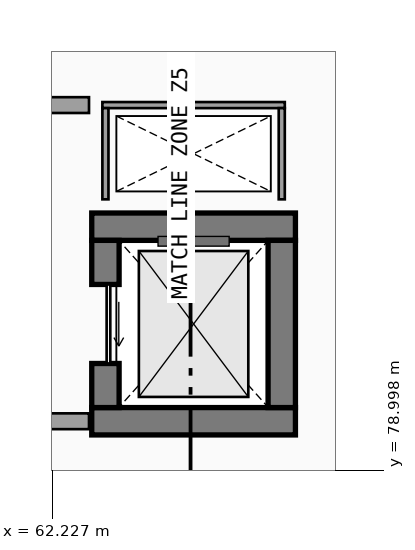
"""IFC4 building model, lengths in metres.
Left out: names, types, materials, properties, quantities, classifications, styles, units other than length and angle.
Written with IfcOpenShell. Run it as: python <this file> out.ifc"""

import sys

from ifc_helpers import new_model, si_unit, direction, frame, frame_2d, origin, place, context, subcontext, project, spatial, rectangle, extrude, element, fill, save


model = new_model("IFC4")
c1 = context("Model", 3, precision=1e-05, world=origin(), true_north=direction((0.0, 1.0)))
c2 = subcontext(c1, "Body", "Model", "MODEL_VIEW")
j1 = project(units=[si_unit("LENGTHUNIT", "METRE"), si_unit("PLANEANGLEUNIT", "RADIAN")], contexts=[c1])
p1 = place(None, origin())
s1 = spatial("IfcSite", under=j1, at=p1, CompositionType="ELEMENT")
p2 = place(p1, origin())
s2 = spatial("IfcBuilding", under=s1, at=p2, CompositionType="ELEMENT")
p3 = place(p2, frame((0.0, 0.0, 9.6)))
s3 = spatial("IfcBuildingStorey", under=s2, at=p3, CompositionType="ELEMENT", Elevation=9.6)
for number, where, z_axis, x_axis in (
    (1, (62.875, 79.8, 0.0), (0.0, 0.0, 1.0), (1.0, 0.0, 0.0)),
    (2, (66.225, 83.0, 0.0), (0.0, 0.0, 1.0), (-1.0, 0.0, 0.0)),
):
    element("IfcWall", number, at=place(p3, frame(where, z_axis=z_axis, x_axis=x_axis)), inside=s3, PredefinedType="SHEAR", context=c2, shape_type="SweptSolid", body=[
        extrude(rectangle(XDim=3.35, YDim=0.45, at=frame_2d((1.675, 0.0))), origin(), (0.0, 0.0, 1.0), 4.22),
    ])
p4 = place(p3, frame((63.1, 82.775, 0.0), z_axis=(0.0, 0.0, 1.0), x_axis=(0.0, -1.0, 0.0)))
e3 = element("IfcWall", 3, at=p4, inside=s3, PredefinedType="SHEAR", context=c2, shape_type="SweptSolid", body=[
    extrude(rectangle(XDim=2.75, YDim=0.45, at=frame_2d((1.375, 0.0))), origin(), (0.0, 0.0, 1.0), 4.22),
])
p5 = place(p4, frame((0.725, 0.0, 0.0), z_axis=(0.0, 0.0, 1.0), x_axis=(1.0, 0.0, 0.0)))
e4 = element("IfcOpeningElement", 4, at=p5, cuts=e3, PredefinedType="OPENING", context=c2, shape_type="SweptSolid", body=[
    extrude(rectangle(XDim=1.3, YDim=2.25, at=frame_2d((0.65, 1.125))), frame((0.0, 0.235, 0.0), z_axis=(0.0, -1.0, 0.0), x_axis=(1.0, 0.0, 0.0)), (0.0, 0.0, 1.0), 0.47),
])
p6 = place(p3, frame((66.0, 80.025, 0.0), z_axis=(0.0, 0.0, 1.0), x_axis=(0.0, 1.0, 0.0)))
e5 = element("IfcWall", 5, at=p6, inside=s3, PredefinedType="SHEAR", context=c2, shape_type="SweptSolid", body=[
    extrude(rectangle(XDim=2.75, YDim=0.45, at=frame_2d((1.375, 0.0))), origin(), (0.0, 0.0, 1.0), 4.22),
])
p7 = place(p3, frame((66.05, 85.0, 0.0), z_axis=(0.0, 0.0, 1.0), x_axis=(-1.0, 0.0, 0.0)))
e6 = element("IfcWall", 6, at=p7, inside=s3, PredefinedType="PARTITIONING", context=c2, shape_type="SweptSolid", body=[
    extrude(rectangle(XDim=3.0, YDim=0.1, at=frame_2d((1.5, 0.0))), origin(), (0.0, 0.0, 1.0), 4.22),
])
for number, where, z_axis, x_axis in (
    (7, (63.1, 84.95, 0.0), (0.0, 0.0, 1.0), (0.0, -1.0, 0.0)),
    (8, (66.0, 83.45, 0.0), (0.0, 0.0, 1.0), (0.0, 1.0, 0.0)),
):
    element("IfcWall", number, at=place(p3, frame(where, z_axis=z_axis, x_axis=x_axis)), inside=s3, PredefinedType="PARTITIONING", context=c2, shape_type="SweptSolid", body=[
        extrude(rectangle(XDim=1.5, YDim=0.1, at=frame_2d((0.75, 0.0))), origin(), (0.0, 0.0, 1.0), 4.22),
    ])
p8 = place(p3, frame((59.07, 79.8, 0.0), z_axis=(0.0, 0.0, 1.0), x_axis=(1.0, 0.0, 0.0)))
e9 = element("IfcWall", 9, at=p8, inside=s3, PredefinedType="SOLIDWALL", context=c2, shape_type="SweptSolid", body=[
    extrude(rectangle(XDim=3.76, YDim=0.26, at=frame_2d((1.88, 0.0))), origin(), (0.0, 0.0, 1.0), 4.22),
])
p9 = place(p3, frame((62.83, 85.0, 0.0), z_axis=(0.0, 0.0, 1.0), x_axis=(-1.0, 0.0, 0.0)))
e10 = element("IfcWall", 10, at=p9, inside=s3, PredefinedType="SOLIDWALL", context=c2, shape_type="SweptSolid", body=[
    extrude(rectangle(XDim=3.76, YDim=0.26, at=frame_2d((1.88, 0.0))), origin(), (0.0, 0.0, 1.0), 4.22),
])
p10 = place(p9, frame((2.805, 0.0, 0.0), z_axis=(0.0, 0.0, 1.0), x_axis=(-1.0, 0.0, 0.0)))
e11 = element("IfcOpeningElement", 11, at=p10, cuts=e10, PredefinedType="OPENING", context=c2, shape_type="SweptSolid", body=[
    extrude(rectangle(XDim=1.85, YDim=2.25, at=frame_2d((0.925, 1.125))), frame((0.0, 0.14, 0.0), z_axis=(0.0, -1.0, 0.0), x_axis=(1.0, 0.0, 0.0)), (0.0, 0.0, 1.0), 0.28),
])
p11 = place(p5, origin())
e12 = element("IfcDoor", 12, at=p11, inside=s3, OperationType="SLIDING_TO_RIGHT", PredefinedType="DOOR", context=c2, shape_type="SweptSolid", body=[
    extrude(rectangle(XDim=1.3, YDim=2.25, at=frame_2d((0.65, 1.125))), frame((0.0, 0.025, 0.0), z_axis=(0.0, -1.0, 0.0), x_axis=(1.0, 0.0, 0.0)), (0.0, 0.0, 1.0), 0.05),
])
fill(e4, e12)
save(model, sys.argv[1])
